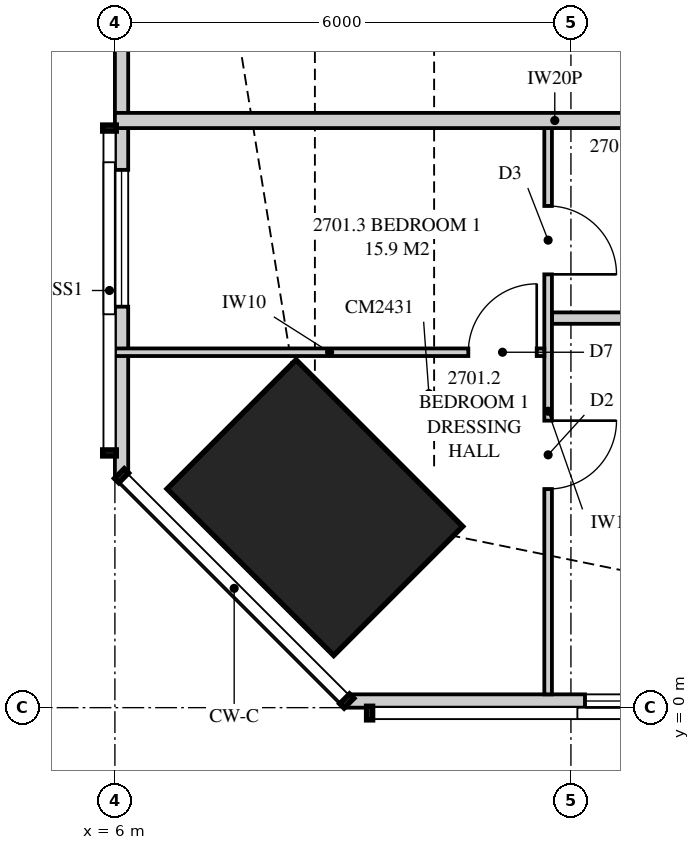
"""IFC4 building model, lengths in metres.
Left out: names, types, materials, properties, quantities, classifications, styles, units other than length and angle.
Written with IfcOpenShell. Run it as: python <this file> out.ifc"""

import sys

from ifc_helpers import new_model, si_unit, direction, frame, frame_2d, origin, origin_2d, place, context, subcontext, project, spatial, polyline, rectangle, outline, extrude, element, fill, save


model = new_model("IFC4")
c1 = context("Model", 3, precision=1e-05, world=origin(), true_north=direction((0.0, 1.0)))
c2 = subcontext(c1, "Body", "Model", "MODEL_VIEW")
j1 = project(units=[si_unit("LENGTHUNIT", "METRE"), si_unit("PLANEANGLEUNIT", "RADIAN")], contexts=[c1])
p1 = place(None, origin())
s1 = spatial("IfcSite", under=j1, at=p1, CompositionType="ELEMENT")
p2 = place(p1, origin())
s2 = spatial("IfcBuilding", under=s1, at=p2, CompositionType="ELEMENT")
p3 = place(p2, frame((0.0, 0.0, 101.5)))
s3 = spatial("IfcBuildingStorey", under=s2, at=p3, CompositionType="ELEMENT", Elevation=101.5)
p4 = place(p3, frame((8.631, 2.631, 0.0), z_axis=(0.0, 0.0, 1.0), x_axis=(0.707106781187, 0.707106781187, 0.0)))
e1 = element("IfcColumn", 1, at=p4, inside=s3, PredefinedType="COLUMN", context=c2, shape_type="SweptSolid", body=[
    extrude(rectangle(XDim=2.4, YDim=3.1, at=origin_2d()), origin(), (0.0, 0.0, 1.0), 3.35),
])
p5 = place(p3, frame((9.051, 0.087, 0.0), z_axis=(0.0, 0.0, 1.0), x_axis=(1.0, 0.0, 0.0)))
e2 = element("IfcWall", 2, at=p5, inside=s3, PredefinedType="SOLIDWALL", context=c2, shape_type="SweptSolid", body=[
    extrude(outline(polyline([(0.0, 0.0), (12.999, 0.0), (12.999, 2.15), (7.824, 2.15), (7.824, 3.11), (7.666, 3.11), (7.666, 2.15), (7.62, 2.15), (7.62, 3.11), (0.0, 3.11), (0.0, 0.0)])), frame((0.0, 0.087, 0.0), z_axis=(0.0, -1.0, 0.0), x_axis=(1.0, 0.0, 0.0)), (0.0, 0.0, 1.0), 0.175),
])
p6 = place(p5, frame((3.134, 0.0, 0.4)))
e3 = element("IfcOpeningElement", 3, at=p6, cuts=e2, PredefinedType="OPENING", context=c2, shape_type="SweptSolid", body=[
    extrude(rectangle(XDim=1.8, YDim=1.7, at=frame_2d((0.9, 0.85))), frame((0.0, 0.097, 0.0), z_axis=(0.0, -1.0, 0.0), x_axis=(1.0, 0.0, 0.0)), (0.0, 0.0, 1.0), 0.195),
])
p7 = place(p5, frame((10.706, 0.0, 0.4)))
e4 = element("IfcOpeningElement", 4, at=p7, cuts=e2, PredefinedType="OPENING", context=c2, shape_type="SweptSolid", body=[
    extrude(rectangle(XDim=1.8, YDim=1.7, at=frame_2d((0.9, 0.85))), frame((0.0, 0.097, 0.0), z_axis=(0.0, -1.0, 0.0), x_axis=(1.0, 0.0, 0.0)), (0.0, 0.0, 1.0), 0.195),
])
p8 = place(p3, frame((6.087, 19.137, 0.0), z_axis=(0.0, 0.0, 1.0), x_axis=(0.0, -1.0, 0.0)))
e5 = element("IfcWall", 5, at=p8, inside=s3, PredefinedType="SOLIDWALL", context=c2, shape_type="SweptSolid", body=[
    extrude(outline(polyline([(0.0, 0.0), (16.086, 0.0), (16.086, 3.11), (6.356, 3.11), (6.356, 2.15), (6.263, 2.15), (6.263, 3.11), (6.137, 3.11), (6.137, 2.15), (0.0, 2.15), (0.0, 0.0)])), frame((0.0, 0.087, 0.0), z_axis=(0.0, -1.0, 0.0), x_axis=(1.0, 0.0, 0.0)), (0.0, 0.0, 1.0), 0.175),
])
p9 = place(p8, frame((1.481, 0.0, 0.4)))
e6 = element("IfcOpeningElement", 6, at=p9, cuts=e5, PredefinedType="OPENING", context=c2, shape_type="SweptSolid", body=[
    extrude(rectangle(XDim=1.8, YDim=1.7, at=frame_2d((0.9, 0.85))), frame((0.0, 0.097, 0.0), z_axis=(0.0, -1.0, 0.0), x_axis=(1.0, 0.0, 0.0)), (0.0, 0.0, 1.0), 0.195),
])
p10 = place(p8, frame((9.076, 0.0, 0.4)))
e7 = element("IfcOpeningElement", 7, at=p10, cuts=e5, PredefinedType="OPENING", context=c2, shape_type="SweptSolid", body=[
    extrude(rectangle(XDim=1.2, YDim=1.7, at=frame_2d((0.6, 0.85))), frame((0.0, 0.097, 0.0), z_axis=(0.0, -1.0, 0.0), x_axis=(1.0, 0.0, 0.0)), (0.0, 0.0, 1.0), 0.195),
])
p11 = place(p8, frame((12.062, 0.0, 0.4)))
e8 = element("IfcOpeningElement", 8, at=p11, cuts=e5, PredefinedType="OPENING", context=c2, shape_type="SweptSolid", body=[
    extrude(rectangle(XDim=1.8, YDim=1.7, at=frame_2d((0.9, 0.85))), frame((0.0, 0.097, 0.0), z_axis=(0.0, -1.0, 0.0), x_axis=(1.0, 0.0, 0.0)), (0.0, 0.0, 1.0), 0.195),
])
p12 = place(p3, frame((11.7, 0.175, 0.0), z_axis=(0.0, 0.0, 1.0), x_axis=(0.0, 1.0, 0.0)))
e9 = element("IfcWall", 9, at=p12, inside=s3, PredefinedType="PARTITIONING", context=c2, shape_type="SweptSolid", body=[
    extrude(outline(polyline([(0.0, 0.0), (7.45, 0.0), (7.45, 3.11), (2.708, 3.11), (2.708, 2.15), (0.953, 2.15), (0.953, 3.11), (0.0, 3.11), (0.0, 0.0)])), frame((0.0, 0.05, 0.0), z_axis=(0.0, -1.0, 0.0), x_axis=(1.0, 0.0, 0.0)), (0.0, 0.0, 1.0), 0.1),
])
p13 = place(p12, frame((2.701, 0.0, 0.0)))
e10 = element("IfcOpeningElement", 10, at=p13, cuts=e9, PredefinedType="OPENING", context=c2, shape_type="SweptSolid", body=[
    extrude(rectangle(XDim=0.9, YDim=2.1, at=frame_2d((0.45, 1.05))), frame((0.0, 0.06, 0.0), z_axis=(0.0, -1.0, 0.0), x_axis=(1.0, 0.0, 0.0)), (0.0, 0.0, 1.0), 0.12),
])
p14 = place(p12, frame((5.525, 0.0, 0.0)))
e11 = element("IfcOpeningElement", 11, at=p14, cuts=e9, PredefinedType="OPENING", context=c2, shape_type="SweptSolid", body=[
    extrude(rectangle(XDim=0.9, YDim=2.1, at=frame_2d((0.45, 1.05))), frame((0.0, 0.06, 0.0), z_axis=(0.0, -1.0, 0.0), x_axis=(1.0, 0.0, 0.0)), (0.0, 0.0, 1.0), 0.12),
])
p15 = place(p3, frame((6.0, 4.676, 0.0), z_axis=(0.0, 0.0, 1.0), x_axis=(1.0, 0.0, 0.0)))
e12 = element("IfcWall", 12, at=p15, inside=s3, PredefinedType="PARTITIONING", context=c2, shape_type="SweptSolid", body=[
    extrude(outline(polyline([(0.0, 0.0), (5.65, 0.0), (5.65, 3.11), (5.46, 3.11), (5.46, 2.51), (3.171, 2.51), (3.171, 2.15), (1.429, 2.15), (1.429, 3.11), (0.0, 3.11), (0.0, 0.0)])), frame((0.0, 0.05, 0.0), z_axis=(0.0, -1.0, 0.0), x_axis=(1.0, 0.0, 0.0)), (0.0, 0.0, 1.0), 0.1),
])
p16 = place(p15, frame((4.65, 0.0, 0.0)))
e13 = element("IfcOpeningElement", 13, at=p16, cuts=e12, PredefinedType="OPENING", context=c2, shape_type="SweptSolid", body=[
    extrude(rectangle(XDim=0.9, YDim=2.1, at=frame_2d((0.45, 1.05))), frame((0.0, 0.06, 0.0), z_axis=(0.0, -1.0, 0.0), x_axis=(1.0, 0.0, 0.0)), (0.0, 0.0, 1.0), 0.12),
])
p17 = place(p3, frame((11.75, 5.125, 0.0), z_axis=(0.0, 0.0, 1.0), x_axis=(1.0, 0.0, 0.0)))
e14 = element("IfcWall", 14, at=p17, inside=s3, PredefinedType="PLUMBINGWALL", context=c2, shape_type="SweptSolid", body=[
    extrude(outline(polyline([(0.0, 0.0), (5.9, 0.0), (5.9, 3.11), (5.438, 3.11), (5.438, 2.541), (4.812, 2.541), (4.812, 3.11), (0.0, 3.11), (0.0, 0.0)])), frame((0.0, 0.075, 0.0), z_axis=(0.0, -1.0, 0.0), x_axis=(1.0, 0.0, 0.0)), (0.0, 0.0, 1.0), 0.15),
])
p18 = place(p17, frame((4.6, 0.0, 0.0)))
e15 = element("IfcOpeningElement", 15, at=p18, cuts=e14, PredefinedType="OPENING", context=c2, shape_type="SweptSolid", body=[
    extrude(rectangle(XDim=0.9, YDim=2.1, at=frame_2d((0.45, 1.05))), frame((0.0, 0.085, 0.0), z_axis=(0.0, -1.0, 0.0), x_axis=(1.0, 0.0, 0.0)), (0.0, 0.0, 1.0), 0.17),
])
p19 = place(p3, frame((6.0, 7.725, 0.0), z_axis=(0.0, 0.0, 1.0), x_axis=(1.0, 0.0, 0.0)))
e16 = element("IfcWall", 16, at=p19, inside=s3, PredefinedType="PARTITIONING", context=c2, shape_type="SweptSolid", body=[
    extrude(outline(polyline([(0.0, 0.0), (11.575, 0.0), (11.575, 3.11), (11.212, 3.11), (11.212, 2.541), (10.538, 2.541), (10.538, 3.11), (5.51, 3.11), (5.51, 2.51), (2.969, 2.51), (2.969, 2.541), (2.727, 2.541), (2.727, 2.15), (0.884, 2.15), (0.884, 3.11), (0.0, 3.11), (0.0, 0.0)])), frame((0.0, 0.1, 0.0), z_axis=(0.0, -1.0, 0.0), x_axis=(1.0, 0.0, 0.0)), (0.0, 0.0, 1.0), 0.2),
])
p20 = place(p6, origin())
e17 = element("IfcWindow", 17, at=p20, inside=s3, PartitioningType="SINGLE_PANEL", PredefinedType="WINDOW", context=c2, shape_type="SweptSolid", body=[
    extrude(rectangle(XDim=1.8, YDim=1.7, at=frame_2d((0.9, 0.85))), frame((0.0, 0.03, 0.0), z_axis=(0.0, -1.0, 0.0), x_axis=(1.0, 0.0, 0.0)), (0.0, 0.0, 1.0), 0.06),
])
fill(e3, e17)
p21 = place(p11, origin())
e18 = element("IfcWindow", 18, at=p21, inside=s3, PartitioningType="SINGLE_PANEL", PredefinedType="WINDOW", context=c2, shape_type="SweptSolid", body=[
    extrude(rectangle(XDim=1.8, YDim=1.7, at=frame_2d((0.9, 0.85))), frame((0.0, 0.03, 0.0), z_axis=(0.0, -1.0, 0.0), x_axis=(1.0, 0.0, 0.0)), (0.0, 0.0, 1.0), 0.06),
])
fill(e8, e18)
p22 = place(p16, origin())
e19 = element("IfcDoor", 19, at=p22, inside=s3, OperationType="SINGLE_SWING_RIGHT", PredefinedType="DOOR", context=c2, shape_type="SweptSolid", body=[
    extrude(rectangle(XDim=0.9, YDim=2.1, at=frame_2d((0.45, 1.05))), frame((0.0, 0.025, 0.0), z_axis=(0.0, -1.0, 0.0), x_axis=(1.0, 0.0, 0.0)), (0.0, 0.0, 1.0), 0.05),
])
fill(e13, e19)
p23 = place(p13, frame((0.9, 0.0, 0.0), z_axis=(0.0, 0.0, 1.0), x_axis=(-1.0, 0.0, 0.0)))
e20 = element("IfcDoor", 20, at=p23, inside=s3, OperationType="SINGLE_SWING_LEFT", PredefinedType="DOOR", context=c2, shape_type="SweptSolid", body=[
    extrude(rectangle(XDim=0.9, YDim=2.1, at=frame_2d((0.45, 1.05))), frame((0.0, 0.025, 0.0), z_axis=(0.0, -1.0, 0.0), x_axis=(1.0, 0.0, 0.0)), (0.0, 0.0, 1.0), 0.05),
])
fill(e10, e20)
p24 = place(p14, frame((0.9, 0.0, 0.0), z_axis=(0.0, 0.0, 1.0), x_axis=(-1.0, 0.0, 0.0)))
e21 = element("IfcDoor", 21, at=p24, inside=s3, OperationType="SINGLE_SWING_RIGHT", PredefinedType="DOOR", context=c2, shape_type="SweptSolid", body=[
    extrude(rectangle(XDim=0.9, YDim=2.1, at=frame_2d((0.45, 1.05))), frame((0.0, 0.025, 0.0), z_axis=(0.0, -1.0, 0.0), x_axis=(1.0, 0.0, 0.0)), (0.0, 0.0, 1.0), 0.05),
])
fill(e11, e21)
save(model, sys.argv[1])
